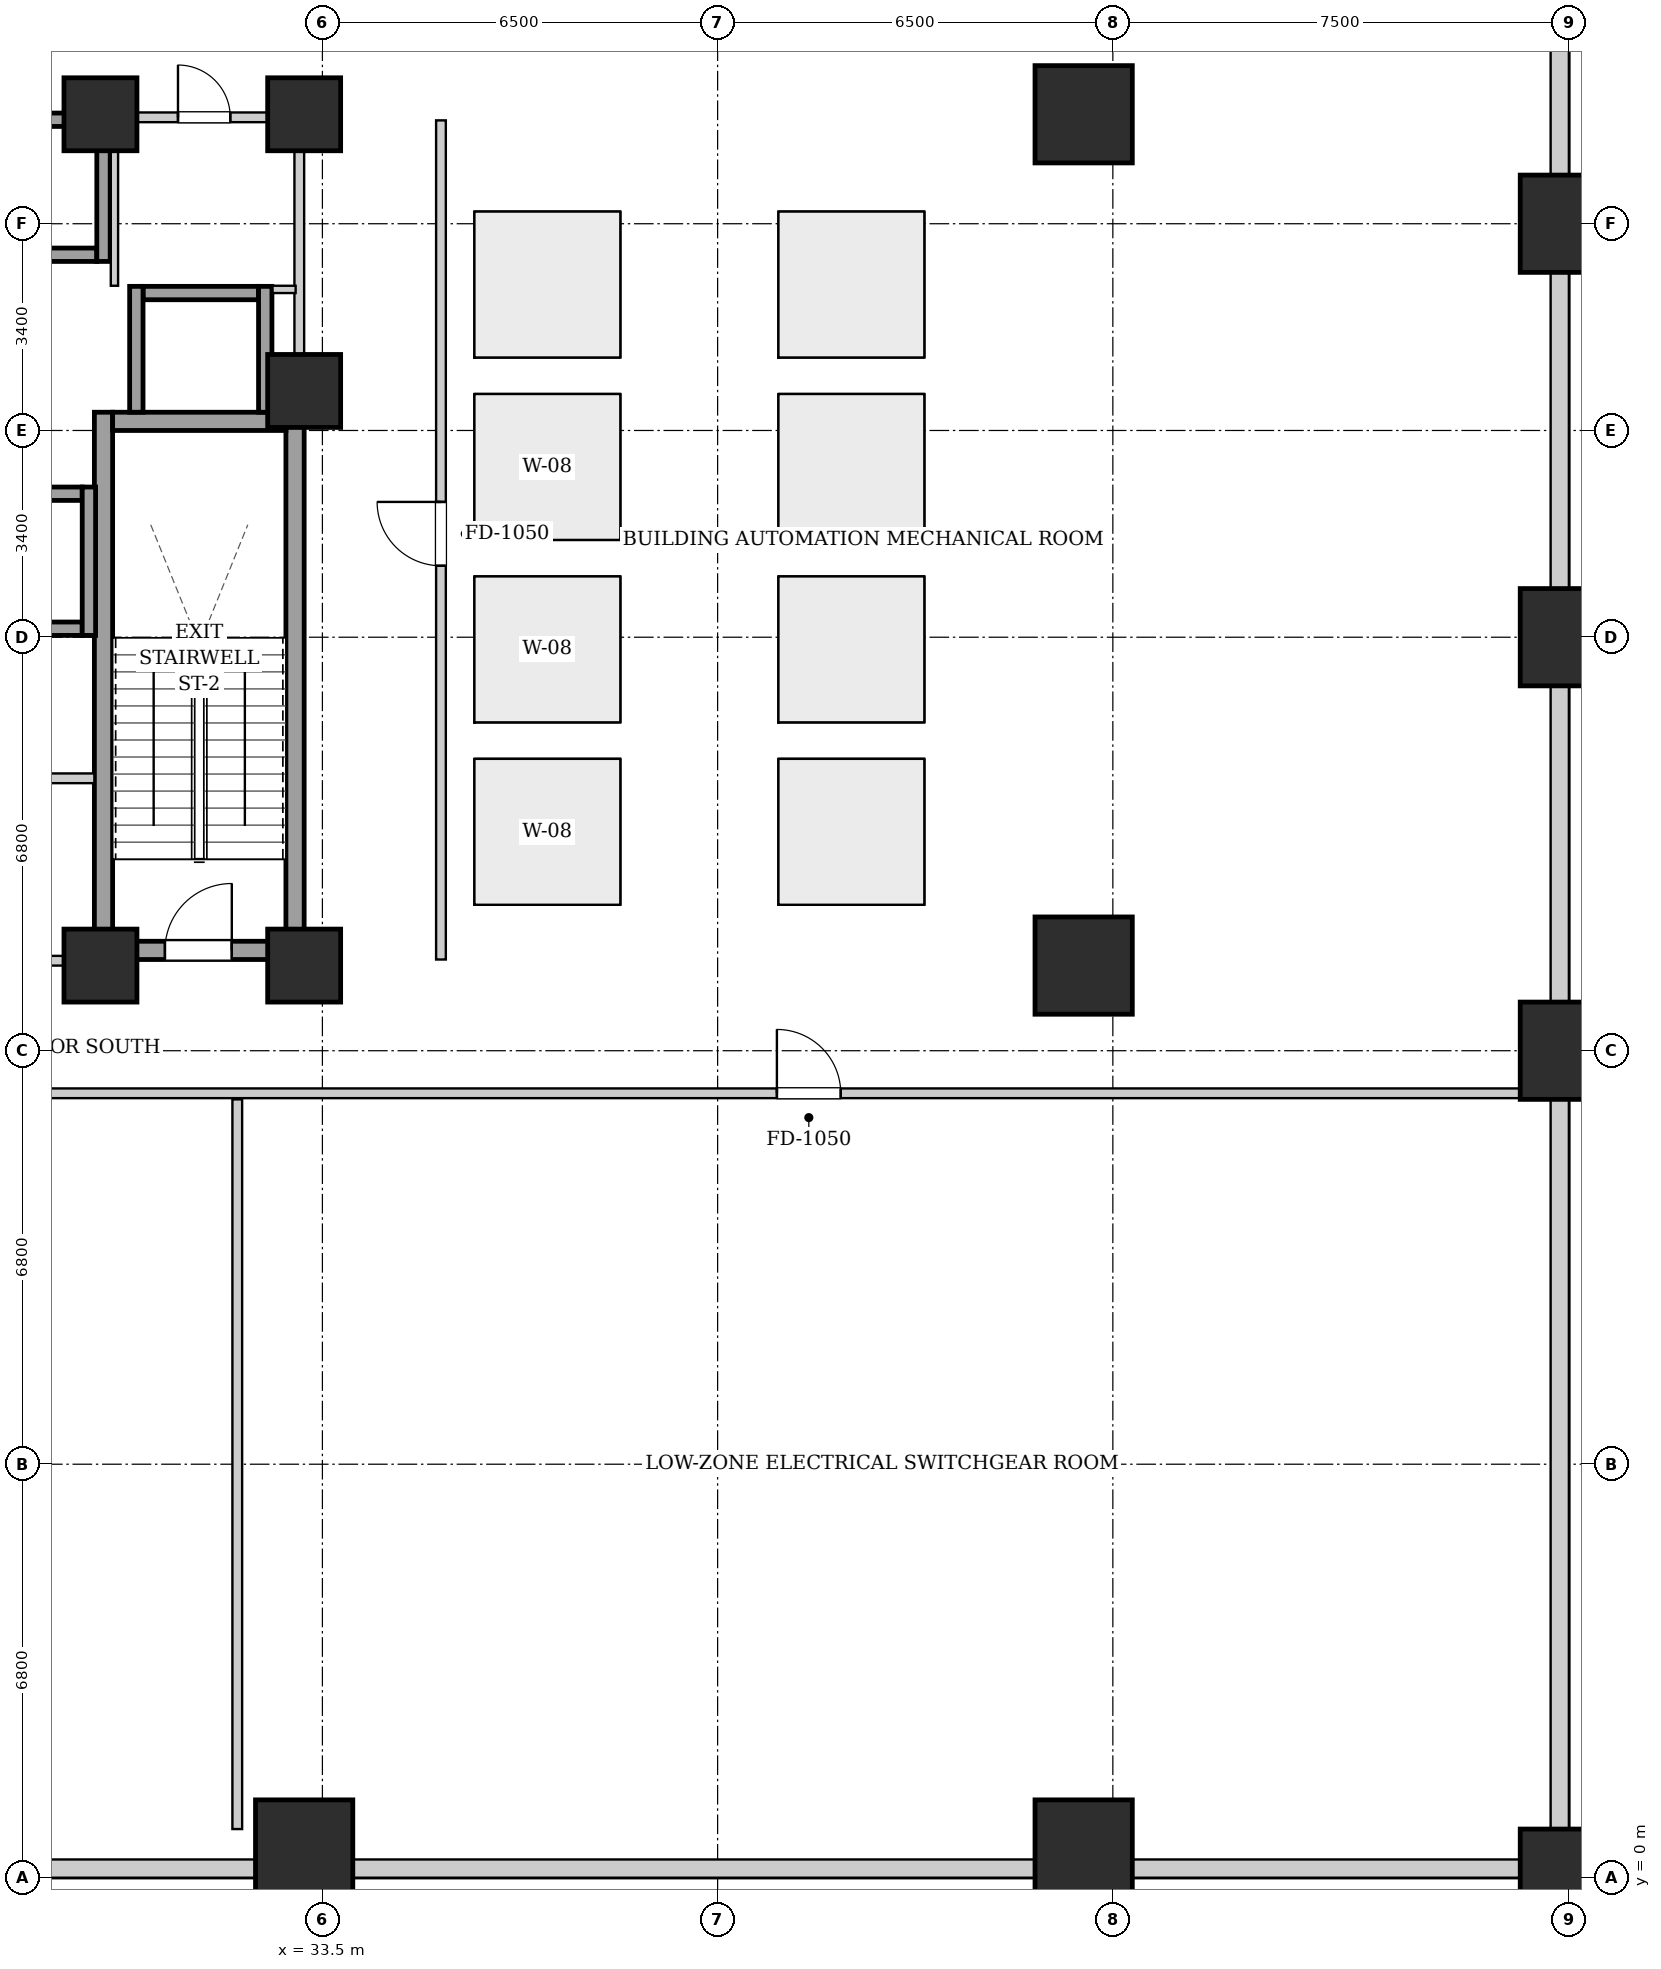
"""IFC4 building model, lengths in metres.
Left out: names, types, materials, properties, quantities, classifications, styles, units other than length and angle.
Written with IfcOpenShell. Run it as: python <this file> out.ifc"""

import sys

from ifc_helpers import new_model, si_unit, direction, frame, frame_2d, origin, origin_2d, place, context, subcontext, project, spatial, rectangle, extrude, element, fill, save


model = new_model("IFC4")
c1 = context("Model", 3, precision=1e-05, world=origin(), true_north=direction((0.0, 1.0)))
c2 = subcontext(c1, "Body", "Model", "MODEL_VIEW")
j1 = project(units=[si_unit("LENGTHUNIT", "METRE"), si_unit("PLANEANGLEUNIT", "RADIAN")], contexts=[c1])
p1 = place(None, origin())
s1 = spatial("IfcSite", under=j1, at=p1, CompositionType="ELEMENT")
p2 = place(p1, origin())
s2 = spatial("IfcBuilding", under=s1, at=p2, CompositionType="ELEMENT")
p3 = place(p2, frame((0.0, 0.0, 20.8)))
s3 = spatial("IfcBuildingStorey", under=s2, at=p3, CompositionType="ELEMENT", Elevation=20.8)
for number, where, z_axis, x_axis in (
    (1, (54.0, 0.0, 0.0), (0.0, 0.0, 1.0), (1.0, 0.0, 0.0)),
    (2, (54.0, 13.6, 0.0), (0.0, 0.0, 1.0), (1.0, 0.0, 0.0)),
    (3, (54.0, 20.4, 0.0), (0.0, 0.0, 1.0), (1.0, 0.0, 0.0)),
    (4, (54.0, 27.2, 0.0), (0.0, 0.0, 1.0), (1.0, 0.0, 0.0)),
    (5, (46.02, 0.48, 0.0), (0.0, 0.0, 1.0), (1.0, 0.0, 0.0)),
    (6, (46.02, 15.0, 0.0), (0.0, 0.0, 1.0), (1.0, 0.0, 0.0)),
    (7, (46.02, 29.0, 0.0), (0.0, 0.0, 1.0), (1.0, 0.0, 0.0)),
    (8, (33.2, 0.48, 0.0), (0.0, 0.0, 1.0), (1.0, 0.0, 0.0)),
):
    element("IfcColumn", number, at=place(p3, frame(where, z_axis=z_axis, x_axis=x_axis)), inside=s3, PredefinedType="COLUMN", context=c2, shape_type="SweptSolid", body=[
        extrude(rectangle(XDim=1.6, YDim=1.6, at=origin_2d()), origin(), (0.0, 0.0, 1.0), 5.0),
    ])
for number, where, z_axis, x_axis in (
    (9, (29.85, 15.0, 0.0), (0.0, 0.0, 1.0), (1.0, 0.0, 0.0)),
    (10, (33.2, 15.0, 0.0), (0.0, 0.0, 1.0), (1.0, 0.0, 0.0)),
    (11, (29.85, 29.0, 0.0), (0.0, 0.0, 1.0), (1.0, 0.0, 0.0)),
    (12, (33.2, 29.0, 0.0), (0.0, 0.0, 1.0), (1.0, 0.0, 0.0)),
    (13, (33.2, 24.45, 0.0), (0.0, 0.0, 1.0), (1.0, 0.0, 0.0)),
):
    element("IfcColumn", number, at=place(p3, frame(where, z_axis=z_axis, x_axis=x_axis)), inside=s3, PredefinedType="COLUMN", context=c2, shape_type="SweptSolid", body=[
        extrude(rectangle(XDim=1.2, YDim=1.2, at=origin_2d()), origin(), (0.0, 0.0, 1.0), 5.0),
    ])
p4 = place(p3, frame((53.85, 47.44, 0.0), z_axis=(0.0, 0.0, 1.0), x_axis=(0.0, -1.0, 0.0)))
e14 = element("IfcWall", 14, at=p4, inside=s3, PredefinedType="SOLIDWALL", context=c2, shape_type="SweptSolid", body=[
    extrude(rectangle(XDim=47.28, YDim=0.3, at=frame_2d((23.64, 0.0))), origin(), (0.0, 0.0, 1.0), 3.625),
])
p5 = place(p3, frame((53.84, 0.15, 0.0), z_axis=(0.0, 0.0, 1.0), x_axis=(-1.0, 0.0, 0.0)))
e15 = element("IfcWall", 15, at=p5, inside=s3, PredefinedType="SOLIDWALL", context=c2, shape_type="SweptSolid", body=[
    extrude(rectangle(XDim=53.68, YDim=0.3, at=frame_2d((26.84, 0.0))), origin(), (0.0, 0.0, 1.0), 2.525),
])
for number, where, z_axis, x_axis in (
    (16, (29.9, 15.1, 0.0), (0.0, 0.0, 1.0), (0.0, 1.0, 0.0)),
    (17, (33.05, 15.1, 0.0), (0.0, 0.0, 1.0), (0.0, 1.0, 0.0)),
):
    element("IfcWall", number, at=place(p3, frame(where, z_axis=z_axis, x_axis=x_axis)), inside=s3, PredefinedType="SHEAR", context=c2, shape_type="SweptSolid", body=[
        extrude(rectangle(XDim=9.0, YDim=0.3, at=frame_2d((4.5, 0.0))), origin(), (0.0, 0.0, 1.0), 4.74),
    ])
p6 = place(p3, frame((30.05, 23.95, 0.0), z_axis=(0.0, 0.0, 1.0), x_axis=(1.0, 0.0, 0.0)))
e18 = element("IfcWall", 18, at=p6, inside=s3, PredefinedType="SHEAR", context=c2, shape_type="SweptSolid", body=[
    extrude(rectangle(XDim=2.85, YDim=0.3, at=frame_2d((1.425, 0.0))), origin(), (0.0, 0.0, 1.0), 4.74),
])
p7 = place(p3, frame((30.05, 15.25, 0.0), z_axis=(0.0, 0.0, 1.0), x_axis=(1.0, 0.0, 0.0)))
e19 = element("IfcWall", 19, at=p7, inside=s3, PredefinedType="SHEAR", context=c2, shape_type="SweptSolid", body=[
    extrude(rectangle(XDim=2.85, YDim=0.3, at=frame_2d((1.425, 0.0))), origin(), (0.0, 0.0, 1.0), 4.74),
])
p8 = place(p7, frame((0.86, 0.0, 0.0)))
e20 = element("IfcOpeningElement", 20, at=p8, cuts=e19, PredefinedType="OPENING", context=c2, shape_type="SweptSolid", body=[
    extrude(rectangle(XDim=1.1, YDim=2.05, at=frame_2d((0.55, 1.025))), frame((0.0, 0.16, 0.0), z_axis=(0.0, -1.0, 0.0), x_axis=(1.0, 0.0, 0.0)), (0.0, 0.0, 1.0), 0.32),
])
for number, where, z_axis, x_axis in (
    (21, (27.93, 26.69, 0.0), (0.0, 0.0, 1.0), (1.0, 0.0, 0.0)),
    (22, (27.93, 28.91, 0.0), (0.0, 0.0, 1.0), (1.0, 0.0, 0.0)),
):
    element("IfcWall", number, at=place(p3, frame(where, z_axis=z_axis, x_axis=x_axis)), inside=s3, PredefinedType="SHEAR", context=c2, shape_type="SweptSolid", body=[
        extrude(rectangle(XDim=1.86, YDim=0.22, at=frame_2d((0.93, 0.0))), origin(), (0.0, 0.0, 1.0), 4.74),
    ])
p9 = place(p3, frame((29.9, 26.58, 0.0), z_axis=(0.0, 0.0, 1.0), x_axis=(0.0, 1.0, 0.0)))
e23 = element("IfcWall", 23, at=p9, inside=s3, PredefinedType="SHEAR", context=c2, shape_type="SweptSolid", body=[
    extrude(rectangle(XDim=2.44, YDim=0.22, at=frame_2d((1.22, 0.0))), origin(), (0.0, 0.0, 1.0), 4.74),
])
for number, where, z_axis, x_axis in (
    (24, (27.65, 20.54, 0.0), (0.0, 0.0, 1.0), (1.0, 0.0, 0.0)),
    (25, (27.65, 22.76, 0.0), (0.0, 0.0, 1.0), (1.0, 0.0, 0.0)),
):
    element("IfcWall", number, at=place(p3, frame(where, z_axis=z_axis, x_axis=x_axis)), inside=s3, PredefinedType="SHEAR", context=c2, shape_type="SweptSolid", body=[
        extrude(rectangle(XDim=1.9, YDim=0.22, at=frame_2d((0.95, 0.0))), origin(), (0.0, 0.0, 1.0), 4.74),
    ])
p10 = place(p3, frame((29.66, 20.43, 0.0), z_axis=(0.0, 0.0, 1.0), x_axis=(0.0, 1.0, 0.0)))
e26 = element("IfcWall", 26, at=p10, inside=s3, PredefinedType="SHEAR", context=c2, shape_type="SweptSolid", body=[
    extrude(rectangle(XDim=2.44, YDim=0.22, at=frame_2d((1.22, 0.0))), origin(), (0.0, 0.0, 1.0), 4.74),
])
p11 = place(p3, frame((30.55, 26.06, 0.0), z_axis=(0.0, 0.0, 1.0), x_axis=(1.0, 0.0, 0.0)))
e27 = element("IfcWall", 27, at=p11, inside=s3, PredefinedType="SHEAR", context=c2, shape_type="SweptSolid", body=[
    extrude(rectangle(XDim=1.9, YDim=0.22, at=frame_2d((0.95, 0.0))), origin(), (0.0, 0.0, 1.0), 4.74),
])
for number, where, z_axis, x_axis in (
    (28, (30.44, 24.1, 0.0), (0.0, 0.0, 1.0), (0.0, 1.0, 0.0)),
    (29, (32.56, 24.1, 0.0), (0.0, 0.0, 1.0), (0.0, 1.0, 0.0)),
):
    element("IfcWall", number, at=place(p3, frame(where, z_axis=z_axis, x_axis=x_axis)), inside=s3, PredefinedType="SHEAR", context=c2, shape_type="SweptSolid", body=[
        extrude(rectangle(XDim=2.07, YDim=0.22, at=frame_2d((1.035, 0.0))), origin(), (0.0, 0.0, 1.0), 4.74),
    ])
p12 = place(p3, frame((21.25, 15.08, 0.0), z_axis=(0.0, 0.0, 1.0), x_axis=(1.0, 0.0, 0.0)))
e30 = element("IfcWall", 30, at=p12, inside=s3, PredefinedType="PARTITIONING", context=c2, shape_type="SweptSolid", body=[
    extrude(rectangle(XDim=8.5, YDim=0.16, at=frame_2d((4.25, 0.0))), origin(), (0.0, 0.0, 1.0), 4.74),
])
p13 = place(p12, frame((3.725, 0.0, 0.0)))
e31 = element("IfcOpeningElement", 31, at=p13, cuts=e30, PredefinedType="OPENING", context=c2, shape_type="SweptSolid", body=[
    extrude(rectangle(XDim=1.05, YDim=2.05, at=frame_2d((0.525, 1.025))), frame((0.0, 0.09, 0.0), z_axis=(0.0, -1.0, 0.0), x_axis=(1.0, 0.0, 0.0)), (0.0, 0.0, 1.0), 0.18),
])
p14 = place(p3, frame((28.65, 18.08, 0.0), z_axis=(0.0, 0.0, 1.0), x_axis=(1.0, 0.0, 0.0)))
e32 = element("IfcWall", 32, at=p14, inside=s3, PredefinedType="PARTITIONING", context=c2, shape_type="SweptSolid", body=[
    extrude(rectangle(XDim=1.1, YDim=0.16, at=frame_2d((0.55, 0.0))), origin(), (0.0, 0.0, 1.0), 4.74),
])
p15 = place(p3, frame((33.12, 24.12, 0.0), z_axis=(0.0, 0.0, 1.0), x_axis=(0.0, 1.0, 0.0)))
e33 = element("IfcWall", 33, at=p15, inside=s3, PredefinedType="PARTITIONING", context=c2, shape_type="SweptSolid", body=[
    extrude(rectangle(XDim=4.76, YDim=0.16, at=frame_2d((2.38, 0.0))), origin(), (0.0, 0.0, 1.0), 4.74),
])
p16 = place(p3, frame((30.08, 26.18, 0.0), z_axis=(0.0, 0.0, 1.0), x_axis=(0.0, 1.0, 0.0)))
e34 = element("IfcWall", 34, at=p16, inside=s3, PredefinedType="PARTITIONING", context=c2, shape_type="SweptSolid", body=[
    extrude(rectangle(XDim=2.68, YDim=0.12, at=frame_2d((1.34, 0.0))), origin(), (0.0, 0.0, 1.0), 4.74),
])
p17 = place(p3, frame((32.68, 26.12, 0.0), z_axis=(0.0, 0.0, 1.0), x_axis=(1.0, 0.0, 0.0)))
e35 = element("IfcWall", 35, at=p17, inside=s3, PredefinedType="PARTITIONING", context=c2, shape_type="SweptSolid", body=[
    extrude(rectangle(XDim=0.38, YDim=0.12, at=frame_2d((0.19, 0.0))), origin(), (0.0, 0.0, 1.0), 4.74),
])
p18 = place(p3, frame((30.08, 28.95, 0.0), z_axis=(0.0, 0.0, 1.0), x_axis=(1.0, 0.0, 0.0)))
e36 = element("IfcWall", 36, at=p18, inside=s3, PredefinedType="PARTITIONING", context=c2, shape_type="SweptSolid", body=[
    extrude(rectangle(XDim=2.96, YDim=0.16, at=frame_2d((1.48, 0.0))), origin(), (0.0, 0.0, 1.0), 4.74),
])
p19 = place(p18, frame((1.045, 0.0, 0.0)))
e37 = element("IfcOpeningElement", 37, at=p19, cuts=e36, PredefinedType="OPENING", context=c2, shape_type="SweptSolid", body=[
    extrude(rectangle(XDim=0.86, YDim=2.05, at=frame_2d((0.43, 1.025))), frame((0.0, 0.09, 0.0), z_axis=(0.0, -1.0, 0.0), x_axis=(1.0, 0.0, 0.0)), (0.0, 0.0, 1.0), 0.18),
])
p20 = place(p3, frame((6.0, 12.9, 0.0), z_axis=(0.0, 0.0, 1.0), x_axis=(1.0, 0.0, 0.0)))
e38 = element("IfcWall", 38, at=p20, inside=s3, PredefinedType="PARTITIONING", context=c2, shape_type="SweptSolid", body=[
    extrude(rectangle(XDim=47.2, YDim=0.16, at=frame_2d((23.6, 0.0))), origin(), (0.0, 0.0, 1.0), 4.74),
])
p21 = place(p20, frame((13.475, 0.0, 0.0)))
e39 = element("IfcOpeningElement", 39, at=p21, cuts=e38, PredefinedType="OPENING", context=c2, shape_type="SweptSolid", body=[
    extrude(rectangle(XDim=1.05, YDim=2.05, at=frame_2d((0.525, 1.025))), frame((0.0, 0.09, 0.0), z_axis=(0.0, -1.0, 0.0), x_axis=(1.0, 0.0, 0.0)), (0.0, 0.0, 1.0), 0.18),
])
p22 = place(p20, frame((34.975, 0.0, 0.0)))
e40 = element("IfcOpeningElement", 40, at=p22, cuts=e38, PredefinedType="OPENING", context=c2, shape_type="SweptSolid", body=[
    extrude(rectangle(XDim=1.05, YDim=2.05, at=frame_2d((0.525, 1.025))), frame((0.0, 0.09, 0.0), z_axis=(0.0, -1.0, 0.0), x_axis=(1.0, 0.0, 0.0)), (0.0, 0.0, 1.0), 0.18),
])
p23 = place(p3, frame((32.1, 0.8, 0.0), z_axis=(0.0, 0.0, 1.0), x_axis=(0.0, 1.0, 0.0)))
e41 = element("IfcWall", 41, at=p23, inside=s3, PredefinedType="PARTITIONING", context=c2, shape_type="SweptSolid", body=[
    extrude(rectangle(XDim=12.0, YDim=0.16, at=frame_2d((6.0, 0.0))), origin(), (0.0, 0.0, 1.0), 4.74),
])
p24 = place(p3, frame((35.45, 15.1, 0.0), z_axis=(0.0, 0.0, 1.0), x_axis=(0.0, 1.0, 0.0)))
e42 = element("IfcWall", 42, at=p24, inside=s3, PredefinedType="PARTITIONING", context=c2, shape_type="SweptSolid", body=[
    extrude(rectangle(XDim=13.8, YDim=0.16, at=frame_2d((6.9, 0.0))), origin(), (0.0, 0.0, 1.0), 4.74),
])
p25 = place(p24, frame((6.475, 0.0, 0.0)))
e43 = element("IfcOpeningElement", 43, at=p25, cuts=e42, PredefinedType="OPENING", context=c2, shape_type="SweptSolid", body=[
    extrude(rectangle(XDim=1.05, YDim=2.05, at=frame_2d((0.525, 1.025))), frame((0.0, 0.09, 0.0), z_axis=(0.0, -1.0, 0.0), x_axis=(1.0, 0.0, 0.0)), (0.0, 0.0, 1.0), 0.18),
])
p26 = place(p3, frame((0.0, 0.0, -0.45)))
p27 = place(p26, frame((37.2, 17.2, 0.4)))
e44 = element("IfcWindow", 44, at=p27, inside=s3, PartitioningType="SINGLE_PANEL", PredefinedType="SKYLIGHT", context=c2, shape_type="SweptSolid", body=[
    extrude(rectangle(XDim=2.4, YDim=2.4, at=origin_2d()), origin(), (0.0, 0.0, 1.0), 0.05),
])
p28 = place(p26, frame((37.2, 20.2, 0.4)))
e45 = element("IfcWindow", 45, at=p28, inside=s3, PartitioningType="SINGLE_PANEL", PredefinedType="SKYLIGHT", context=c2, shape_type="SweptSolid", body=[
    extrude(rectangle(XDim=2.4, YDim=2.4, at=origin_2d()), origin(), (0.0, 0.0, 1.0), 0.05),
])
p29 = place(p26, frame((37.2, 23.2, 0.4)))
e46 = element("IfcWindow", 46, at=p29, inside=s3, PartitioningType="SINGLE_PANEL", PredefinedType="SKYLIGHT", context=c2, shape_type="SweptSolid", body=[
    extrude(rectangle(XDim=2.4, YDim=2.4, at=origin_2d()), origin(), (0.0, 0.0, 1.0), 0.05),
])
p30 = place(p26, frame((37.2, 26.2, 0.4)))
e47 = element("IfcWindow", 47, at=p30, inside=s3, PartitioningType="SINGLE_PANEL", PredefinedType="SKYLIGHT", context=c2, shape_type="SweptSolid", body=[
    extrude(rectangle(XDim=2.4, YDim=2.4, at=origin_2d()), origin(), (0.0, 0.0, 1.0), 0.05),
])
p31 = place(p26, frame((42.2, 17.2, 0.4)))
e48 = element("IfcWindow", 48, at=p31, inside=s3, PartitioningType="SINGLE_PANEL", PredefinedType="SKYLIGHT", context=c2, shape_type="SweptSolid", body=[
    extrude(rectangle(XDim=2.4, YDim=2.4, at=origin_2d()), origin(), (0.0, 0.0, 1.0), 0.05),
])
p32 = place(p26, frame((42.2, 20.2, 0.4)))
e49 = element("IfcWindow", 49, at=p32, inside=s3, PartitioningType="SINGLE_PANEL", PredefinedType="SKYLIGHT", context=c2, shape_type="SweptSolid", body=[
    extrude(rectangle(XDim=2.4, YDim=2.4, at=origin_2d()), origin(), (0.0, 0.0, 1.0), 0.05),
])
p33 = place(p26, frame((42.2, 23.2, 0.4)))
e50 = element("IfcWindow", 50, at=p33, inside=s3, PartitioningType="SINGLE_PANEL", PredefinedType="SKYLIGHT", context=c2, shape_type="SweptSolid", body=[
    extrude(rectangle(XDim=2.4, YDim=2.4, at=origin_2d()), origin(), (0.0, 0.0, 1.0), 0.05),
])
p34 = place(p26, frame((42.2, 26.2, 0.4)))
e51 = element("IfcWindow", 51, at=p34, inside=s3, PartitioningType="SINGLE_PANEL", PredefinedType="SKYLIGHT", context=c2, shape_type="SweptSolid", body=[
    extrude(rectangle(XDim=2.4, YDim=2.4, at=origin_2d()), origin(), (0.0, 0.0, 1.0), 0.05),
])
p35 = place(p8, origin())
e52 = element("IfcDoor", 52, at=p35, inside=s3, OperationType="SINGLE_SWING_RIGHT", PredefinedType="DOOR", context=c2, shape_type="SweptSolid", body=[
    extrude(rectangle(XDim=1.1, YDim=2.05, at=frame_2d((0.55, 1.025))), frame((0.0, 0.025, 0.0), z_axis=(0.0, -1.0, 0.0), x_axis=(1.0, 0.0, 0.0)), (0.0, 0.0, 1.0), 0.05),
])
fill(e20, e52)
p36 = place(p19, origin())
e53 = element("IfcDoor", 53, at=p36, inside=s3, OperationType="SINGLE_SWING_LEFT", PredefinedType="DOOR", context=c2, shape_type="SweptSolid", body=[
    extrude(rectangle(XDim=0.86, YDim=2.05, at=frame_2d((0.43, 1.025))), frame((0.0, 0.025, 0.0), z_axis=(0.0, -1.0, 0.0), x_axis=(1.0, 0.0, 0.0)), (0.0, 0.0, 1.0), 0.05),
])
fill(e37, e53)
p37 = place(p22, origin())
e54 = element("IfcDoor", 54, at=p37, inside=s3, OperationType="SINGLE_SWING_LEFT", PredefinedType="DOOR", context=c2, shape_type="SweptSolid", body=[
    extrude(rectangle(XDim=1.05, YDim=2.05, at=frame_2d((0.525, 1.025))), frame((0.0, 0.025, 0.0), z_axis=(0.0, -1.0, 0.0), x_axis=(1.0, 0.0, 0.0)), (0.0, 0.0, 1.0), 0.05),
])
fill(e40, e54)
p38 = place(p25, origin())
e55 = element("IfcDoor", 55, at=p38, inside=s3, OperationType="SINGLE_SWING_RIGHT", PredefinedType="DOOR", context=c2, shape_type="SweptSolid", body=[
    extrude(rectangle(XDim=1.05, YDim=2.05, at=frame_2d((0.525, 1.025))), frame((0.0, 0.025, 0.0), z_axis=(0.0, -1.0, 0.0), x_axis=(1.0, 0.0, 0.0)), (0.0, 0.0, 1.0), 0.05),
])
fill(e43, e55)
save(model, sys.argv[1])
